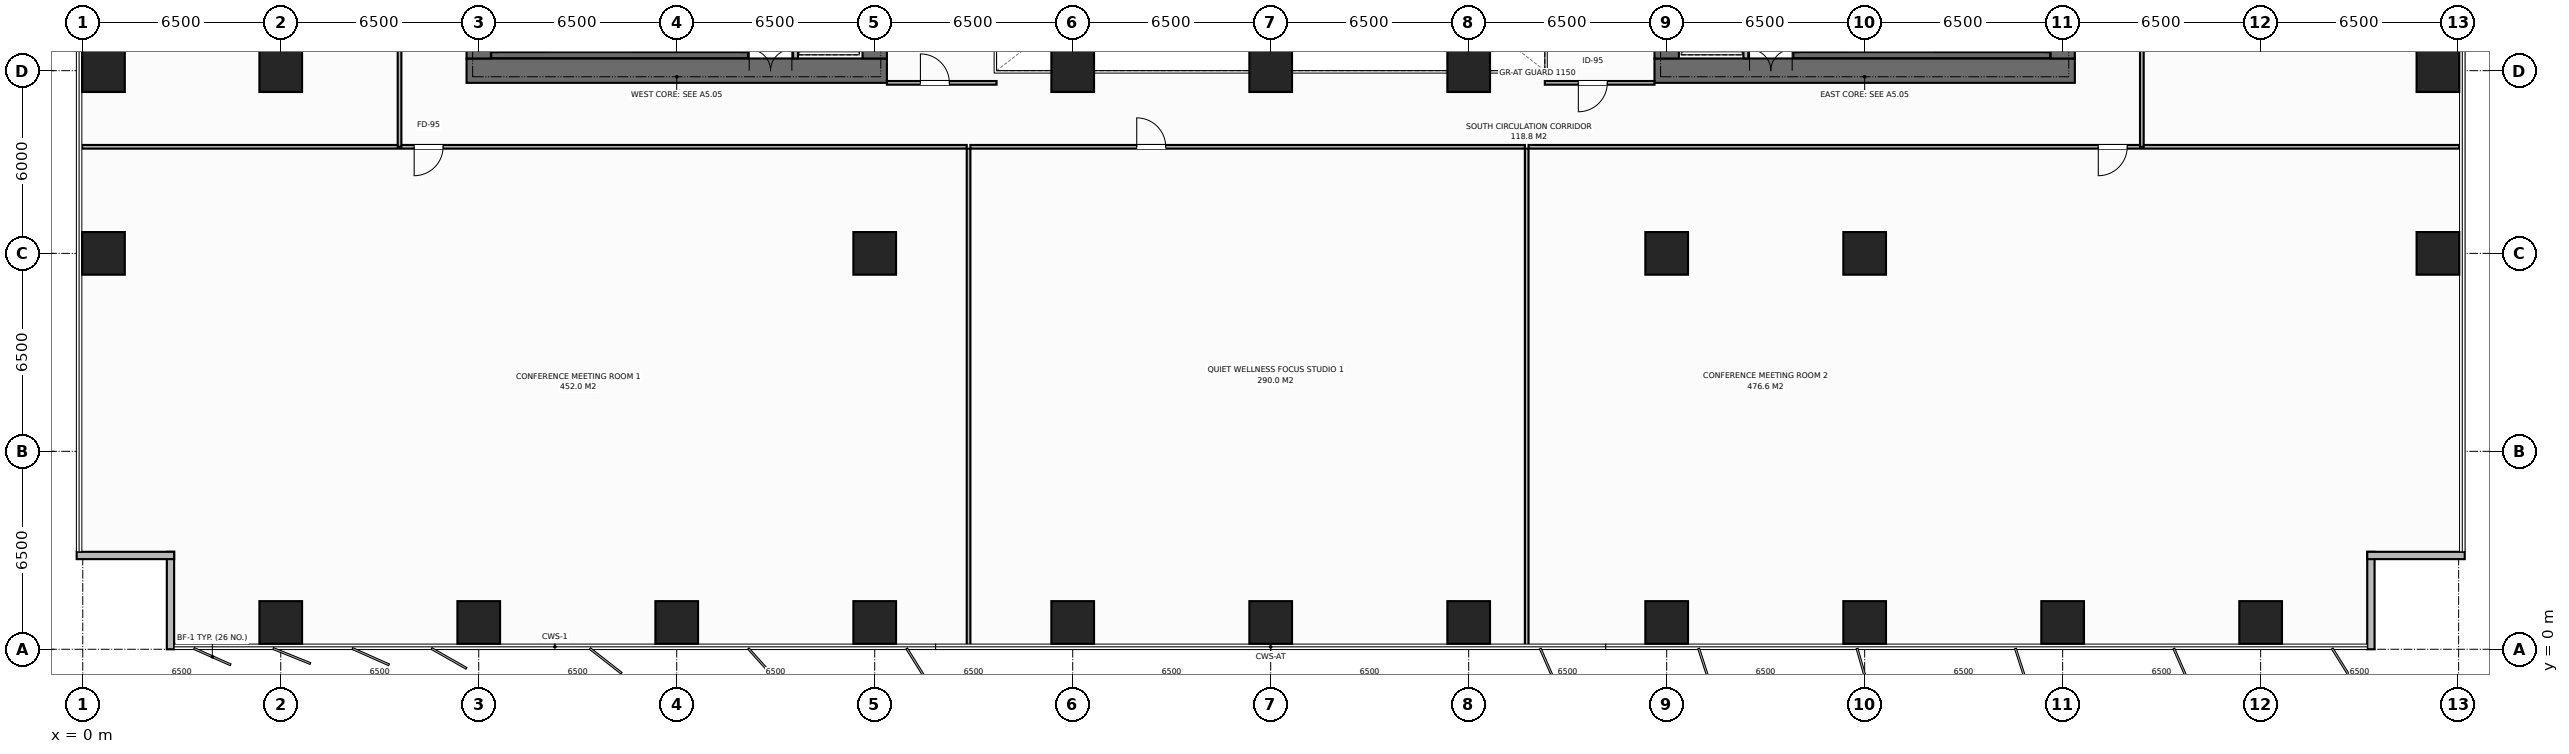
"""IFC4 building model, lengths in metres.
Left out: names, types, materials, properties, quantities, classifications, styles, units other than length and angle.
Written with IfcOpenShell. Run it as: python <this file> out.ifc"""

import sys

from ifc_helpers import new_model, si_unit, direction, frame, frame_2d, origin, origin_2d, place, context, subcontext, project, spatial, rectangle, extrude, element, fill, save


model = new_model("IFC4")
c1 = context("Model", 3, precision=1e-05, world=origin(), true_north=direction((0.0, 1.0)))
c2 = subcontext(c1, "Body", "Model", "MODEL_VIEW")
j1 = project(units=[si_unit("LENGTHUNIT", "METRE"), si_unit("PLANEANGLEUNIT", "RADIAN")], contexts=[c1])
p1 = place(None, origin())
s1 = spatial("IfcSite", under=j1, at=p1, CompositionType="ELEMENT")
p2 = place(p1, origin())
s2 = spatial("IfcBuilding", under=s1, at=p2, CompositionType="ELEMENT")
p3 = place(p2, frame((0.0, 0.0, 58.2)))
s3 = spatial("IfcBuildingStorey", under=s2, at=p3, CompositionType="ELEMENT", Elevation=58.2)
p4 = place(p3, frame((12.6, 19.0, 0.0), z_axis=(0.0, 0.0, 1.0), x_axis=(1.0, 0.0, 0.0)))
e1 = element("IfcWall", 1, at=p4, inside=s3, PredefinedType="SHEAR", context=c2, shape_type="SweptSolid", body=[
    extrude(rectangle(XDim=13.8, YDim=0.8, at=frame_2d((6.9, 0.0))), origin(), (0.0, 0.0, 1.0), 3.8),
])
p5 = place(p4, frame((9.28, 0.0, 0.0)))
e2 = element("IfcOpeningElement", 2, at=p5, cuts=e1, PredefinedType="OPENING", context=c2, shape_type="SweptSolid", body=[
    extrude(rectangle(XDim=1.4, YDim=2.2, at=frame_2d((0.7, 1.1))), frame((0.0, 0.41, 0.0), z_axis=(0.0, -1.0, 0.0), x_axis=(1.0, 0.0, 0.0)), (0.0, 0.0, 1.0), 0.82),
])
p6 = place(p3, frame((13.0, 19.4, 0.0), z_axis=(0.0, 0.0, 1.0), x_axis=(0.0, 1.0, 0.0)))
e3 = element("IfcWall", 3, at=p6, inside=s3, PredefinedType="SHEAR", context=c2, shape_type="SweptSolid", body=[
    extrude(rectangle(XDim=13.2, YDim=0.8, at=frame_2d((6.6, 0.0))), origin(), (0.0, 0.0, 1.0), 3.8),
])
p7 = place(p6, frame((4.65, 0.0, 0.0)))
e4 = element("IfcOpeningElement", 4, at=p7, cuts=e3, PredefinedType="OPENING", context=c2, shape_type="SweptSolid", body=[
    extrude(rectangle(XDim=1.4, YDim=2.2, at=frame_2d((0.7, 1.1))), frame((0.0, 0.41, 0.0), z_axis=(0.0, -1.0, 0.0), x_axis=(1.0, 0.0, 0.0)), (0.0, 0.0, 1.0), 0.82),
])
p8 = place(p3, frame((26.0, 19.4, 0.0), z_axis=(0.0, 0.0, 1.0), x_axis=(0.0, 1.0, 0.0)))
e5 = element("IfcWall", 5, at=p8, inside=s3, PredefinedType="SHEAR", context=c2, shape_type="SweptSolid", body=[
    extrude(rectangle(XDim=13.2, YDim=0.8, at=frame_2d((6.6, 0.0))), origin(), (0.0, 0.0, 1.0), 3.8),
])
p9 = place(p3, frame((51.6, 19.0, 0.0), z_axis=(0.0, 0.0, 1.0), x_axis=(1.0, 0.0, 0.0)))
e6 = element("IfcWall", 6, at=p9, inside=s3, PredefinedType="SHEAR", context=c2, shape_type="SweptSolid", body=[
    extrude(rectangle(XDim=13.8, YDim=0.8, at=frame_2d((6.9, 0.0))), origin(), (0.0, 0.0, 1.0), 3.8),
])
p10 = place(p9, frame((3.12, 0.0, 0.0)))
e7 = element("IfcOpeningElement", 7, at=p10, cuts=e6, PredefinedType="OPENING", context=c2, shape_type="SweptSolid", body=[
    extrude(rectangle(XDim=1.4, YDim=2.2, at=frame_2d((0.7, 1.1))), frame((0.0, 0.41, 0.0), z_axis=(0.0, -1.0, 0.0), x_axis=(1.0, 0.0, 0.0)), (0.0, 0.0, 1.0), 0.82),
])
p11 = place(p3, frame((52.0, 19.4, 0.0), z_axis=(0.0, 0.0, 1.0), x_axis=(0.0, 1.0, 0.0)))
e8 = element("IfcWall", 8, at=p11, inside=s3, PredefinedType="SHEAR", context=c2, shape_type="SweptSolid", body=[
    extrude(rectangle(XDim=13.2, YDim=0.8, at=frame_2d((6.6, 0.0))), origin(), (0.0, 0.0, 1.0), 3.8),
])
p12 = place(p3, frame((65.0, 19.4, 0.0), z_axis=(0.0, 0.0, 1.0), x_axis=(0.0, 1.0, 0.0)))
e9 = element("IfcWall", 9, at=p12, inside=s3, PredefinedType="SHEAR", context=c2, shape_type="SweptSolid", body=[
    extrude(rectangle(XDim=13.2, YDim=0.8, at=frame_2d((6.6, 0.0))), origin(), (0.0, 0.0, 1.0), 3.8),
])
p13 = place(p12, frame((8.05, 0.0, 0.0)))
e10 = element("IfcOpeningElement", 10, at=p13, cuts=e9, PredefinedType="OPENING", context=c2, shape_type="SweptSolid", body=[
    extrude(rectangle(XDim=1.3, YDim=2.2, at=frame_2d((0.65, 1.1))), frame((0.0, 0.41, 0.0), z_axis=(0.0, -1.0, 0.0), x_axis=(1.0, 0.0, 0.0)), (0.0, 0.0, 1.0), 0.82),
])
for number, where, z_axis, x_axis in (
    (11, (13.41, 19.51, 0.0), (0.0, 0.0, 1.0), (1.0, 0.0, 0.0)),
    (12, (56.16, 19.51, 0.0), (0.0, 0.0, 1.0), (1.0, 0.0, 0.0)),
):
    element("IfcWall", number, at=place(p3, frame(where, z_axis=z_axis, x_axis=x_axis)), inside=s3, PredefinedType="SHEAR", context=c2, shape_type="SweptSolid", body=[
        extrude(rectangle(XDim=8.43, YDim=0.2, at=frame_2d((4.215, 0.0))), origin(), (0.0, 0.0, 1.0), 3.8),
    ])
for number, where, z_axis, x_axis in (
    (13, (58.5, 13.0, 0.0), (0.0, 0.0, 1.0), (1.0, 0.0, 0.0)),
    (14, (6.5, 19.0, 0.0), (0.0, 0.0, 1.0), (1.0, 0.0, 0.0)),
    (15, (32.5, 19.0, 0.0), (0.0, 0.0, 1.0), (1.0, 0.0, 0.0)),
    (16, (39.0, 19.0, 0.0), (0.0, 0.0, 1.0), (1.0, 0.0, 0.0)),
    (17, (45.5, 19.0, 0.0), (0.0, 0.0, 1.0), (1.0, 0.0, 0.0)),
    (18, (26.0, 13.0, 0.0), (0.0, 0.0, 1.0), (1.0, 0.0, 0.0)),
    (19, (52.0, 13.0, 0.0), (0.0, 0.0, 1.0), (1.0, 0.0, 0.0)),
    (20, (6.5, 0.88, 0.0), (0.0, 0.0, 1.0), (1.0, 0.0, 0.0)),
    (21, (13.0, 0.88, 0.0), (0.0, 0.0, 1.0), (1.0, 0.0, 0.0)),
    (22, (19.5, 0.88, 0.0), (0.0, 0.0, 1.0), (1.0, 0.0, 0.0)),
    (23, (26.0, 0.88, 0.0), (0.0, 0.0, 1.0), (1.0, 0.0, 0.0)),
    (24, (32.5, 0.88, 0.0), (0.0, 0.0, 1.0), (1.0, 0.0, 0.0)),
    (25, (39.0, 0.88, 0.0), (0.0, 0.0, 1.0), (1.0, 0.0, 0.0)),
    (26, (45.5, 0.88, 0.0), (0.0, 0.0, 1.0), (1.0, 0.0, 0.0)),
    (27, (52.0, 0.88, 0.0), (0.0, 0.0, 1.0), (1.0, 0.0, 0.0)),
    (28, (58.5, 0.88, 0.0), (0.0, 0.0, 1.0), (1.0, 0.0, 0.0)),
    (29, (65.0, 0.88, 0.0), (0.0, 0.0, 1.0), (1.0, 0.0, 0.0)),
    (30, (71.5, 0.88, 0.0), (0.0, 0.0, 1.0), (1.0, 0.0, 0.0)),
    (31, (0.68, 13.0, 0.0), (0.0, 0.0, 1.0), (1.0, 0.0, 0.0)),
    (32, (77.32, 13.0, 0.0), (0.0, 0.0, 1.0), (1.0, 0.0, 0.0)),
    (33, (0.68, 19.0, 0.0), (0.0, 0.0, 1.0), (1.0, 0.0, 0.0)),
    (34, (77.32, 19.0, 0.0), (0.0, 0.0, 1.0), (1.0, 0.0, 0.0)),
):
    element("IfcColumn", number, at=place(p3, frame(where, z_axis=z_axis, x_axis=x_axis)), inside=s3, PredefinedType="COLUMN", context=c2, shape_type="SweptSolid", body=[
        extrude(rectangle(XDim=1.4, YDim=1.4, at=origin_2d()), origin(), (0.0, 0.0, 1.0), 3.8),
    ])
for number, where, z_axis, x_axis in (
    (35, (2.88, 0.0, 0.0), (0.0, 0.0, 1.0), (0.0, 1.0, 0.0)),
    (36, (3.0, 3.08, 0.0), (0.0, 0.0, 1.0), (-1.0, 0.0, 0.0)),
    (37, (75.12, 3.2, 0.0), (0.0, 0.0, 1.0), (0.0, -1.0, 0.0)),
    (38, (78.2, 3.08, 0.0), (0.0, 0.0, 1.0), (-1.0, 0.0, 0.0)),
):
    element("IfcWall", number, at=place(p3, frame(where, z_axis=z_axis, x_axis=x_axis)), inside=s3, PredefinedType="STANDARD", context=c2, shape_type="SweptSolid", body=[
        extrude(rectangle(XDim=3.2, YDim=0.24, at=frame_2d((1.6, 0.0))), origin(), (0.0, 0.0, 1.0), 3.55),
    ])
p14 = place(p3, frame((23.4, 19.4, 0.0), z_axis=(0.0, 0.0, 1.0), x_axis=(0.0, 1.0, 0.0)))
e39 = element("IfcWall", 39, at=p14, inside=s3, PredefinedType="STANDARD", context=c2, shape_type="SweptSolid", body=[
    extrude(rectangle(XDim=13.2, YDim=0.16, at=frame_2d((6.6, 0.0))), origin(), (0.0, 0.0, 1.0), 3.55),
])
p15 = place(p14, frame((0.55, 0.0, 0.0)))
e40 = element("IfcOpeningElement", 40, at=p15, cuts=e39, PredefinedType="OPENING", context=c2, shape_type="SweptSolid", body=[
    extrude(rectangle(XDim=1.1, YDim=2.2, at=frame_2d((0.55, 1.1))), frame((0.0, 0.09, 0.0), z_axis=(0.0, -1.0, 0.0), x_axis=(1.0, 0.0, 0.0)), (0.0, 0.0, 1.0), 0.18),
])
p16 = place(p14, frame((2.7, 0.0, 0.0)))
e41 = element("IfcOpeningElement", 41, at=p16, cuts=e39, PredefinedType="OPENING", context=c2, shape_type="SweptSolid", body=[
    extrude(rectangle(XDim=1.1, YDim=2.2, at=frame_2d((0.55, 1.1))), frame((0.0, 0.09, 0.0), z_axis=(0.0, -1.0, 0.0), x_axis=(1.0, 0.0, 0.0)), (0.0, 0.0, 1.0), 0.18),
])
p17 = place(p3, frame((54.6, 19.4, 0.0), z_axis=(0.0, 0.0, 1.0), x_axis=(0.0, 1.0, 0.0)))
e42 = element("IfcWall", 42, at=p17, inside=s3, PredefinedType="STANDARD", context=c2, shape_type="SweptSolid", body=[
    extrude(rectangle(XDim=13.2, YDim=0.16, at=frame_2d((6.6, 0.0))), origin(), (0.0, 0.0, 1.0), 3.55),
])
p18 = place(p17, frame((0.55, 0.0, 0.0)))
e43 = element("IfcOpeningElement", 43, at=p18, cuts=e42, PredefinedType="OPENING", context=c2, shape_type="SweptSolid", body=[
    extrude(rectangle(XDim=1.1, YDim=2.2, at=frame_2d((0.55, 1.1))), frame((0.0, 0.09, 0.0), z_axis=(0.0, -1.0, 0.0), x_axis=(1.0, 0.0, 0.0)), (0.0, 0.0, 1.0), 0.18),
])
p19 = place(p17, frame((2.7, 0.0, 0.0)))
e44 = element("IfcOpeningElement", 44, at=p19, cuts=e42, PredefinedType="OPENING", context=c2, shape_type="SweptSolid", body=[
    extrude(rectangle(XDim=1.1, YDim=2.2, at=frame_2d((0.55, 1.1))), frame((0.0, 0.09, 0.0), z_axis=(0.0, -1.0, 0.0), x_axis=(1.0, 0.0, 0.0)), (0.0, 0.0, 1.0), 0.18),
])
p20 = place(p3, frame((26.4, 18.6, 0.0), z_axis=(0.0, 0.0, 1.0), x_axis=(1.0, 0.0, 0.0)))
e45 = element("IfcWall", 45, at=p20, inside=s3, PredefinedType="PARTITIONING", context=c2, shape_type="SweptSolid", body=[
    extrude(rectangle(XDim=3.6, YDim=0.12, at=frame_2d((1.8, 0.0))), origin(), (0.0, 0.0, 1.0), 3.55),
])
p21 = place(p20, frame((1.1, 0.0, 0.0)))
e46 = element("IfcOpeningElement", 46, at=p21, cuts=e45, PredefinedType="OPENING", context=c2, shape_type="SweptSolid", body=[
    extrude(rectangle(XDim=0.95, YDim=2.15, at=frame_2d((0.475, 1.075))), frame((0.0, 0.07, 0.0), z_axis=(0.0, -1.0, 0.0), x_axis=(1.0, 0.0, 0.0)), (0.0, 0.0, 1.0), 0.14),
])
p22 = place(p3, frame((48.0, 18.6, 0.0), z_axis=(0.0, 0.0, 1.0), x_axis=(1.0, 0.0, 0.0)))
e47 = element("IfcWall", 47, at=p22, inside=s3, PredefinedType="PARTITIONING", context=c2, shape_type="SweptSolid", body=[
    extrude(rectangle(XDim=3.6, YDim=0.12, at=frame_2d((1.8, 0.0))), origin(), (0.0, 0.0, 1.0), 3.55),
])
p23 = place(p22, frame((1.1, 0.0, 0.0)))
e48 = element("IfcOpeningElement", 48, at=p23, cuts=e47, PredefinedType="OPENING", context=c2, shape_type="SweptSolid", body=[
    extrude(rectangle(XDim=0.95, YDim=2.15, at=frame_2d((0.475, 1.075))), frame((0.0, 0.07, 0.0), z_axis=(0.0, -1.0, 0.0), x_axis=(1.0, 0.0, 0.0)), (0.0, 0.0, 1.0), 0.14),
])
p24 = place(p3, frame((29.081, 0.02, 0.0), z_axis=(0.0, 0.0, 1.0), x_axis=(0.0, 1.0, 0.0)))
e49 = element("IfcWall", 49, at=p24, inside=s3, PredefinedType="PARTITIONING", context=c2, shape_type="SweptSolid", body=[
    extrude(rectangle(XDim=16.42, YDim=0.12, at=frame_2d((8.21, 0.0))), origin(), (0.0, 0.0, 1.0), 3.55),
])
p25 = place(p3, frame((-0.02, 16.5, 0.0), z_axis=(0.0, 0.0, 1.0), x_axis=(1.0, 0.0, 0.0)))
e50 = element("IfcWall", 50, at=p25, inside=s3, PredefinedType="PARTITIONING", context=c2, shape_type="SweptSolid", body=[
    extrude(rectangle(XDim=29.041, YDim=0.12, at=frame_2d((14.521, 0.0))), origin(), (0.0, 0.0, 1.0), 3.55),
])
p26 = place(p25, frame((10.9, 0.0, 0.0)))
e51 = element("IfcOpeningElement", 51, at=p26, cuts=e50, PredefinedType="OPENING", context=c2, shape_type="SweptSolid", body=[
    extrude(rectangle(XDim=0.95, YDim=2.15, at=frame_2d((0.475, 1.075))), frame((0.0, 0.07, 0.0), z_axis=(0.0, -1.0, 0.0), x_axis=(1.0, 0.0, 0.0)), (0.0, 0.0, 1.0), 0.14),
])
p27 = place(p3, frame((47.405, 0.02, 0.0), z_axis=(0.0, 0.0, 1.0), x_axis=(0.0, 1.0, 0.0)))
e52 = element("IfcWall", 52, at=p27, inside=s3, PredefinedType="PARTITIONING", context=c2, shape_type="SweptSolid", body=[
    extrude(rectangle(XDim=16.42, YDim=0.12, at=frame_2d((8.21, 0.0))), origin(), (0.0, 0.0, 1.0), 3.55),
])
p28 = place(p3, frame((29.141, 16.5, 0.0), z_axis=(0.0, 0.0, 1.0), x_axis=(1.0, 0.0, 0.0)))
e53 = element("IfcWall", 53, at=p28, inside=s3, PredefinedType="PARTITIONING", context=c2, shape_type="SweptSolid", body=[
    extrude(rectangle(XDim=18.204, YDim=0.12, at=frame_2d((9.102, 0.0))), origin(), (0.0, 0.0, 1.0), 3.55),
])
p29 = place(p28, frame((5.461, 0.0, 0.0)))
e54 = element("IfcOpeningElement", 54, at=p29, cuts=e53, PredefinedType="OPENING", context=c2, shape_type="SweptSolid", body=[
    extrude(rectangle(XDim=0.95, YDim=2.15, at=frame_2d((0.475, 1.075))), frame((0.0, 0.07, 0.0), z_axis=(0.0, -1.0, 0.0), x_axis=(1.0, 0.0, 0.0)), (0.0, 0.0, 1.0), 0.14),
])
p30 = place(p3, frame((47.465, 16.5, 0.0), z_axis=(0.0, 0.0, 1.0), x_axis=(1.0, 0.0, 0.0)))
e55 = element("IfcWall", 55, at=p30, inside=s3, PredefinedType="PARTITIONING", context=c2, shape_type="SweptSolid", body=[
    extrude(rectangle(XDim=30.555, YDim=0.12, at=frame_2d((15.278, 0.0))), origin(), (0.0, 0.0, 1.0), 3.55),
])
p31 = place(p30, frame((18.705, 0.0, 0.0)))
e56 = element("IfcOpeningElement", 56, at=p31, cuts=e55, PredefinedType="OPENING", context=c2, shape_type="SweptSolid", body=[
    extrude(rectangle(XDim=0.95, YDim=2.15, at=frame_2d((0.475, 1.075))), frame((0.0, 0.07, 0.0), z_axis=(0.0, -1.0, 0.0), x_axis=(1.0, 0.0, 0.0)), (0.0, 0.0, 1.0), 0.14),
])
p32 = place(p3, frame((10.4, 16.5, 0.0), z_axis=(0.0, 0.0, 1.0), x_axis=(0.0, 1.0, 0.0)))
e57 = element("IfcWall", 57, at=p32, inside=s3, PredefinedType="PARTITIONING", context=c2, shape_type="SweptSolid", body=[
    extrude(rectangle(XDim=6.333, YDim=0.12, at=frame_2d((3.167, 0.0))), origin(), (0.0, 0.0, 1.0), 3.55),
])
p33 = place(p32, frame((3.742, 0.0, 0.0)))
e58 = element("IfcOpeningElement", 58, at=p33, cuts=e57, PredefinedType="OPENING", context=c2, shape_type="SweptSolid", body=[
    extrude(rectangle(XDim=0.95, YDim=2.15, at=frame_2d((0.475, 1.075))), frame((0.0, 0.07, 0.0), z_axis=(0.0, -1.0, 0.0), x_axis=(1.0, 0.0, 0.0)), (0.0, 0.0, 1.0), 0.14),
])
p34 = place(p3, frame((67.6, 16.5, 0.0), z_axis=(0.0, 0.0, 1.0), x_axis=(0.0, 1.0, 0.0)))
e59 = element("IfcWall", 59, at=p34, inside=s3, PredefinedType="PARTITIONING", context=c2, shape_type="SweptSolid", body=[
    extrude(rectangle(XDim=19.0, YDim=0.12, at=frame_2d((9.5, 0.0))), origin(), (0.0, 0.0, 1.0), 3.55),
])
p35 = place(p34, frame((9.025, 0.0, 0.0)))
e60 = element("IfcOpeningElement", 60, at=p35, cuts=e59, PredefinedType="OPENING", context=c2, shape_type="SweptSolid", body=[
    extrude(rectangle(XDim=0.95, YDim=2.15, at=frame_2d((0.475, 1.075))), frame((0.0, 0.07, 0.0), z_axis=(0.0, -1.0, 0.0), x_axis=(1.0, 0.0, 0.0)), (0.0, 0.0, 1.0), 0.14),
])
p36 = place(p5, origin())
e61 = element("IfcDoor", 61, at=p36, inside=s3, OperationType="DOUBLE_DOOR_SINGLE_SWING", PredefinedType="DOOR", context=c2, shape_type="SweptSolid", body=[
    extrude(rectangle(XDim=1.4, YDim=2.2, at=frame_2d((0.7, 1.1))), frame((0.0, 0.125, 0.0), z_axis=(0.0, -1.0, 0.0), x_axis=(1.0, 0.0, 0.0)), (0.0, 0.0, 1.0), 0.05),
])
fill(e2, e61)
p37 = place(p10, origin())
e62 = element("IfcDoor", 62, at=p37, inside=s3, OperationType="DOUBLE_DOOR_SINGLE_SWING", PredefinedType="DOOR", context=c2, shape_type="SweptSolid", body=[
    extrude(rectangle(XDim=1.4, YDim=2.2, at=frame_2d((0.7, 1.1))), frame((0.0, 0.125, 0.0), z_axis=(0.0, -1.0, 0.0), x_axis=(1.0, 0.0, 0.0)), (0.0, 0.0, 1.0), 0.05),
])
fill(e7, e62)
p38 = place(p21, origin())
e63 = element("IfcDoor", 63, at=p38, inside=s3, OperationType="SINGLE_SWING_LEFT", PredefinedType="DOOR", context=c2, shape_type="SweptSolid", body=[
    extrude(rectangle(XDim=0.95, YDim=2.15, at=frame_2d((0.475, 1.075))), frame((0.0, 0.025, 0.0), z_axis=(0.0, -1.0, 0.0), x_axis=(1.0, 0.0, 0.0)), (0.0, 0.0, 1.0), 0.05),
])
fill(e46, e63)
p39 = place(p23, origin())
e64 = element("IfcDoor", 64, at=p39, inside=s3, OperationType="SINGLE_SWING_RIGHT", PredefinedType="DOOR", context=c2, shape_type="SweptSolid", body=[
    extrude(rectangle(XDim=0.95, YDim=2.15, at=frame_2d((0.475, 1.075))), frame((0.0, 0.025, 0.0), z_axis=(0.0, -1.0, 0.0), x_axis=(1.0, 0.0, 0.0)), (0.0, 0.0, 1.0), 0.05),
])
fill(e48, e64)
p40 = place(p26, origin())
e65 = element("IfcDoor", 65, at=p40, inside=s3, OperationType="SINGLE_SWING_RIGHT", PredefinedType="DOOR", context=c2, shape_type="SweptSolid", body=[
    extrude(rectangle(XDim=0.95, YDim=2.15, at=frame_2d((0.475, 1.075))), frame((0.0, 0.025, 0.0), z_axis=(0.0, -1.0, 0.0), x_axis=(1.0, 0.0, 0.0)), (0.0, 0.0, 1.0), 0.05),
])
fill(e51, e65)
p41 = place(p29, origin())
e66 = element("IfcDoor", 66, at=p41, inside=s3, OperationType="SINGLE_SWING_LEFT", PredefinedType="DOOR", context=c2, shape_type="SweptSolid", body=[
    extrude(rectangle(XDim=0.95, YDim=2.15, at=frame_2d((0.475, 1.075))), frame((0.0, 0.025, 0.0), z_axis=(0.0, -1.0, 0.0), x_axis=(1.0, 0.0, 0.0)), (0.0, 0.0, 1.0), 0.05),
])
fill(e54, e66)
p42 = place(p31, origin())
e67 = element("IfcDoor", 67, at=p42, inside=s3, OperationType="SINGLE_SWING_RIGHT", PredefinedType="DOOR", context=c2, shape_type="SweptSolid", body=[
    extrude(rectangle(XDim=0.95, YDim=2.15, at=frame_2d((0.475, 1.075))), frame((0.0, 0.025, 0.0), z_axis=(0.0, -1.0, 0.0), x_axis=(1.0, 0.0, 0.0)), (0.0, 0.0, 1.0), 0.05),
])
fill(e56, e67)
save(model, sys.argv[1])
